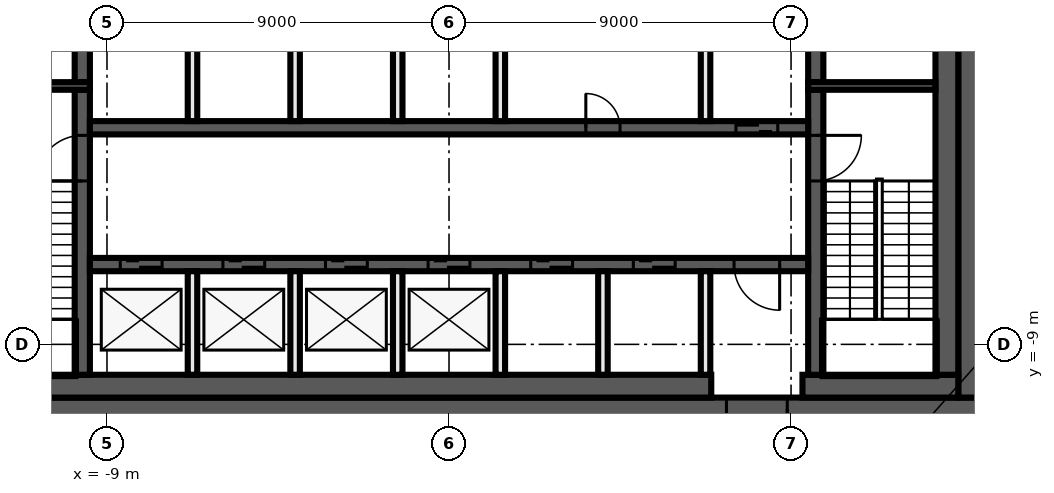
"""IFC4 building model, lengths in metres.
Left out: names, types, materials, properties, quantities, classifications, styles, units other than length and angle.
Written with IfcOpenShell. Run it as: python <this file> out.ifc"""

import sys

from ifc_helpers import new_model, si_unit, direction, frame, frame_2d, origin, place, context, subcontext, project, spatial, rectangle, extrude, element, fill, save


model = new_model("IFC4")
c1 = context("Model", 3, precision=1e-05, world=origin(), true_north=direction((0.0, 1.0)))
c2 = subcontext(c1, "Body", "Model", "MODEL_VIEW")
j1 = project(units=[si_unit("LENGTHUNIT", "METRE"), si_unit("PLANEANGLEUNIT", "RADIAN")], contexts=[c1])
p1 = place(None, origin())
s1 = spatial("IfcSite", under=j1, at=p1, CompositionType="ELEMENT")
p2 = place(p1, origin())
s2 = spatial("IfcBuilding", under=s1, at=p2, CompositionType="ELEMENT")
p3 = place(p2, frame((0.0, 0.0, 289.2)))
s3 = spatial("IfcBuildingStorey", under=s2, at=p3, CompositionType="ELEMENT", Elevation=289.2)
p4 = place(p3, frame((14.0, -10.7, 0.0), z_axis=(0.0, 0.0, 1.0), x_axis=(-1.0, 0.0, 0.0)))
e1 = element("IfcWall", 1, at=p4, inside=s3, PredefinedType="SHEAR", context=c2, shape_type="SweptSolid", body=[
    extrude(rectangle(XDim=28.0, YDim=0.6, at=frame_2d((14.0, 0.0))), origin(), (0.0, 0.0, 1.0), 4.62),
])
p5 = place(p4, frame((5.1, 0.0, 0.0)))
e2 = element("IfcOpeningElement", 2, at=p5, cuts=e1, PredefinedType="OPENING", context=c2, shape_type="SweptSolid", body=[
    extrude(rectangle(XDim=1.6, YDim=2.1, at=frame_2d((0.8, 1.05))), frame((0.0, 0.31, 0.0), z_axis=(0.0, -1.0, 0.0), x_axis=(1.0, 0.0, 0.0)), (0.0, 0.0, 1.0), 0.62),
])
p6 = place(p3, frame((13.7, 10.4, 0.0), z_axis=(0.0, 0.0, 1.0), x_axis=(0.0, -1.0, 0.0)))
e3 = element("IfcWall", 3, at=p6, inside=s3, PredefinedType="SHEAR", context=c2, shape_type="SweptSolid", body=[
    extrude(rectangle(XDim=20.8, YDim=0.6, at=frame_2d((10.4, 0.0))), origin(), (0.0, 0.0, 1.0), 4.62),
])
p7 = place(p3, frame((13.4, -10.1, 0.0), z_axis=(0.0, 0.0, 1.0), x_axis=(-1.0, 0.0, 0.0)))
e4 = element("IfcWall", 4, at=p7, inside=s3, PredefinedType="SHEAR", context=c2, shape_type="SweptSolid", body=[
    extrude(rectangle(XDim=4.1, YDim=0.6, at=frame_2d((2.05, 0.0))), origin(), (0.0, 0.0, 1.0), 4.62),
])
p8 = place(p3, frame((6.9, -10.1, 0.0), z_axis=(0.0, 0.0, 1.0), x_axis=(-1.0, 0.0, 0.0)))
e5 = element("IfcWall", 5, at=p8, inside=s3, PredefinedType="SHEAR", context=c2, shape_type="SweptSolid", body=[
    extrude(rectangle(XDim=20.3, YDim=0.6, at=frame_2d((10.15, 0.0))), origin(), (0.0, 0.0, 1.0), 4.62),
])
p9 = place(p3, frame((13.1, 9.8, 0.0), z_axis=(0.0, 0.0, 1.0), x_axis=(0.0, -1.0, 0.0)))
e6 = element("IfcWall", 6, at=p9, inside=s3, PredefinedType="SHEAR", context=c2, shape_type="SweptSolid", body=[
    extrude(rectangle(XDim=19.6, YDim=0.6, at=frame_2d((9.8, 0.0))), origin(), (0.0, 0.0, 1.0), 4.62),
])
p10 = place(p3, frame((9.65, -2.3, 0.0), z_axis=(0.0, 0.0, 1.0), x_axis=(0.0, -1.0, 0.0)))
e7 = element("IfcWall", 7, at=p10, inside=s3, PredefinedType="SHEAR", context=c2, shape_type="SweptSolid", body=[
    extrude(rectangle(XDim=7.5, YDim=0.4, at=frame_2d((3.75, 0.0))), origin(), (0.0, 0.0, 1.0), 4.62),
])
p11 = place(p10, frame((1.2, 0.0, 0.0)))
e8 = element("IfcOpeningElement", 8, at=p11, cuts=e7, PredefinedType="OPENING", context=c2, shape_type="SweptSolid", body=[
    extrude(rectangle(XDim=1.2, YDim=2.1, at=frame_2d((0.6, 1.05))), frame((0.0, 0.21, 0.0), z_axis=(0.0, -1.0, 0.0), x_axis=(1.0, 0.0, 0.0)), (0.0, 0.0, 1.0), 0.42),
])
p12 = place(p3, frame((9.65, 2.1, 0.0), z_axis=(0.0, 0.0, 1.0), x_axis=(0.0, -1.0, 0.0)))
e9 = element("IfcWall", 9, at=p12, inside=s3, PredefinedType="SHEAR", context=c2, shape_type="SweptSolid", body=[
    extrude(rectangle(XDim=4.2, YDim=0.4, at=frame_2d((2.1, 0.0))), origin(), (0.0, 0.0, 1.0), 4.62),
])
p13 = place(p12, frame((0.15, 0.0, 0.0)))
e10 = element("IfcOpeningElement", 10, at=p13, cuts=e9, PredefinedType="OPENING", context=c2, shape_type="SweptSolid", body=[
    extrude(rectangle(XDim=0.9, YDim=2.1, at=frame_2d((0.45, 1.05))), frame((0.0, 0.21, 0.0), z_axis=(0.0, -1.0, 0.0), x_axis=(1.0, 0.0, 0.0)), (0.0, 0.0, 1.0), 0.42),
])
p14 = place(p3, frame((-9.65, -9.8, 0.0), z_axis=(0.0, 0.0, 1.0), x_axis=(0.0, 1.0, 0.0)))
e11 = element("IfcWall", 11, at=p14, inside=s3, PredefinedType="SHEAR", context=c2, shape_type="SweptSolid", body=[
    extrude(rectangle(XDim=7.5, YDim=0.4, at=frame_2d((3.75, 0.0))), origin(), (0.0, 0.0, 1.0), 4.62),
])
p15 = place(p14, frame((5.1, 0.0, 0.0)))
e12 = element("IfcOpeningElement", 12, at=p15, cuts=e11, PredefinedType="OPENING", context=c2, shape_type="SweptSolid", body=[
    extrude(rectangle(XDim=1.2, YDim=2.1, at=frame_2d((0.6, 1.05))), frame((0.0, 0.21, 0.0), z_axis=(0.0, -1.0, 0.0), x_axis=(1.0, 0.0, 0.0)), (0.0, 0.0, 1.0), 0.42),
])
p16 = place(p3, frame((-9.65, -2.1, 0.0), z_axis=(0.0, 0.0, 1.0), x_axis=(0.0, 1.0, 0.0)))
e13 = element("IfcWall", 13, at=p16, inside=s3, PredefinedType="SHEAR", context=c2, shape_type="SweptSolid", body=[
    extrude(rectangle(XDim=4.2, YDim=0.4, at=frame_2d((2.1, 0.0))), origin(), (0.0, 0.0, 1.0), 4.62),
])
for number, where, z_axis, x_axis in (
    (14, (9.45, -2.2, 0.0), (0.0, 0.0, 1.0), (1.0, 0.0, 0.0)),
    (15, (-9.45, -2.2, 0.0), (0.0, 0.0, 1.0), (-1.0, 0.0, 0.0)),
):
    element("IfcWall", number, at=place(p3, frame(where, z_axis=z_axis, x_axis=x_axis)), inside=s3, PredefinedType="SHEAR", context=c2, shape_type="SweptSolid", body=[
        extrude(rectangle(XDim=3.35, YDim=0.2, at=frame_2d((1.675, 0.0))), origin(), (0.0, 0.0, 1.0), 4.62),
    ])
p17 = place(p3, frame((-9.45, -3.3, 0.0), z_axis=(0.0, 0.0, 1.0), x_axis=(1.0, 0.0, 0.0)))
e16 = element("IfcWall", 16, at=p17, inside=s3, PredefinedType="SHEAR", context=c2, shape_type="SweptSolid", body=[
    extrude(rectangle(XDim=18.9, YDim=0.35, at=frame_2d((9.45, 0.0))), origin(), (0.0, 0.0, 1.0), 4.62),
])
p18 = place(p17, frame((17.0, 0.0, 0.0)))
e17 = element("IfcOpeningElement", 17, at=p18, cuts=e16, PredefinedType="OPENING", context=c2, shape_type="SweptSolid", body=[
    extrude(rectangle(XDim=1.1, YDim=2.1, at=frame_2d((0.55, 1.05))), frame((0.0, 0.185, 0.0), z_axis=(0.0, -1.0, 0.0), x_axis=(1.0, 0.0, 0.0)), (0.0, 0.0, 1.0), 0.37),
])
p19 = place(p17, frame((13.05, 0.0, 0.0)))
e18 = element("IfcOpeningElement", 18, at=p19, cuts=e16, PredefinedType="OPENING", context=c2, shape_type="SweptSolid", body=[
    extrude(rectangle(XDim=0.9, YDim=2.1, at=frame_2d((0.45, 1.05))), frame((0.0, 0.185, 0.0), z_axis=(0.0, -1.0, 0.0), x_axis=(1.0, 0.0, 0.0)), (0.0, 0.0, 1.0), 0.37),
])
p20 = place(p3, frame((9.45, -6.9, 0.0), z_axis=(0.0, 0.0, 1.0), x_axis=(-1.0, 0.0, 0.0)))
e19 = element("IfcWall", 19, at=p20, inside=s3, PredefinedType="SHEAR", context=c2, shape_type="SweptSolid", body=[
    extrude(rectangle(XDim=18.9, YDim=0.35, at=frame_2d((9.45, 0.0))), origin(), (0.0, 0.0, 1.0), 4.62),
])
p21 = place(p20, frame((17.0, 0.0, 0.0)))
e20 = element("IfcOpeningElement", 20, at=p21, cuts=e19, PredefinedType="OPENING", context=c2, shape_type="SweptSolid", body=[
    extrude(rectangle(XDim=1.1, YDim=2.1, at=frame_2d((0.55, 1.05))), frame((0.0, 0.185, 0.0), z_axis=(0.0, -1.0, 0.0), x_axis=(1.0, 0.0, 0.0)), (0.0, 0.0, 1.0), 0.37),
])
p22 = place(p20, frame((14.3, 0.0, 0.0)))
e21 = element("IfcOpeningElement", 21, at=p22, cuts=e19, PredefinedType="OPENING", context=c2, shape_type="SweptSolid", body=[
    extrude(rectangle(XDim=1.1, YDim=2.1, at=frame_2d((0.55, 1.05))), frame((0.0, 0.185, 0.0), z_axis=(0.0, -1.0, 0.0), x_axis=(1.0, 0.0, 0.0)), (0.0, 0.0, 1.0), 0.37),
])
p23 = place(p20, frame((11.6, 0.0, 0.0)))
e22 = element("IfcOpeningElement", 22, at=p23, cuts=e19, PredefinedType="OPENING", context=c2, shape_type="SweptSolid", body=[
    extrude(rectangle(XDim=1.1, YDim=2.1, at=frame_2d((0.55, 1.05))), frame((0.0, 0.185, 0.0), z_axis=(0.0, -1.0, 0.0), x_axis=(1.0, 0.0, 0.0)), (0.0, 0.0, 1.0), 0.37),
])
p24 = place(p20, frame((8.9, 0.0, 0.0)))
e23 = element("IfcOpeningElement", 23, at=p24, cuts=e19, PredefinedType="OPENING", context=c2, shape_type="SweptSolid", body=[
    extrude(rectangle(XDim=1.1, YDim=2.1, at=frame_2d((0.55, 1.05))), frame((0.0, 0.185, 0.0), z_axis=(0.0, -1.0, 0.0), x_axis=(1.0, 0.0, 0.0)), (0.0, 0.0, 1.0), 0.37),
])
p25 = place(p20, frame((6.2, 0.0, 0.0)))
e24 = element("IfcOpeningElement", 24, at=p25, cuts=e19, PredefinedType="OPENING", context=c2, shape_type="SweptSolid", body=[
    extrude(rectangle(XDim=1.1, YDim=2.1, at=frame_2d((0.55, 1.05))), frame((0.0, 0.185, 0.0), z_axis=(0.0, -1.0, 0.0), x_axis=(1.0, 0.0, 0.0)), (0.0, 0.0, 1.0), 0.37),
])
p26 = place(p20, frame((3.5, 0.0, 0.0)))
e25 = element("IfcOpeningElement", 25, at=p26, cuts=e19, PredefinedType="OPENING", context=c2, shape_type="SweptSolid", body=[
    extrude(rectangle(XDim=1.1, YDim=2.1, at=frame_2d((0.55, 1.05))), frame((0.0, 0.185, 0.0), z_axis=(0.0, -1.0, 0.0), x_axis=(1.0, 0.0, 0.0)), (0.0, 0.0, 1.0), 0.37),
])
p27 = place(p20, frame((0.75, 0.0, 0.0)))
e26 = element("IfcOpeningElement", 26, at=p27, cuts=e19, PredefinedType="OPENING", context=c2, shape_type="SweptSolid", body=[
    extrude(rectangle(XDim=1.2, YDim=2.1, at=frame_2d((0.6, 1.05))), frame((0.0, 0.185, 0.0), z_axis=(0.0, -1.0, 0.0), x_axis=(1.0, 0.0, 0.0)), (0.0, 0.0, 1.0), 0.37),
])
for number, where, z_axis, x_axis in (
    (27, (6.75, -9.8, 0.0), (0.0, 0.0, 1.0), (0.0, 1.0, 0.0)),
    (28, (6.75, -3.125, 0.0), (0.0, 0.0, 1.0), (0.0, 1.0, 0.0)),
    (29, (4.05, -9.8, 0.0), (0.0, 0.0, 1.0), (0.0, 1.0, 0.0)),
    (30, (1.35, -9.8, 0.0), (0.0, 0.0, 1.0), (0.0, 1.0, 0.0)),
    (31, (1.35, -3.125, 0.0), (0.0, 0.0, 1.0), (0.0, 1.0, 0.0)),
    (32, (-1.35, -9.8, 0.0), (0.0, 0.0, 1.0), (0.0, 1.0, 0.0)),
    (33, (-1.35, -3.125, 0.0), (0.0, 0.0, 1.0), (0.0, 1.0, 0.0)),
    (34, (-4.05, -9.8, 0.0), (0.0, 0.0, 1.0), (0.0, 1.0, 0.0)),
    (35, (-4.05, -3.125, 0.0), (0.0, 0.0, 1.0), (0.0, 1.0, 0.0)),
    (36, (-6.75, -9.8, 0.0), (0.0, 0.0, 1.0), (0.0, 1.0, 0.0)),
    (37, (-6.75, -3.125, 0.0), (0.0, 0.0, 1.0), (0.0, 1.0, 0.0)),
):
    element("IfcWall", number, at=place(p3, frame(where, z_axis=z_axis, x_axis=x_axis)), inside=s3, PredefinedType="SOLIDWALL", context=c2, shape_type="SweptSolid", body=[
        extrude(rectangle(XDim=2.725, YDim=0.25, at=frame_2d((1.363, 0.0))), origin(), (0.0, 0.0, 1.0), 4.62),
    ])
p28 = place(p18, origin())
e38 = element("IfcDoor", 38, at=p28, inside=s3, OperationType="DOUBLE_DOOR_SLIDING", PredefinedType="DOOR", context=c2, shape_type="SweptSolid", body=[
    extrude(rectangle(XDim=1.1, YDim=2.1, at=frame_2d((0.55, 1.05))), frame((0.0, 0.025, 0.0), z_axis=(0.0, -1.0, 0.0), x_axis=(1.0, 0.0, 0.0)), (0.0, 0.0, 1.0), 0.05),
])
fill(e17, e38)
p29 = place(p21, origin())
e39 = element("IfcDoor", 39, at=p29, inside=s3, OperationType="DOUBLE_DOOR_SLIDING", PredefinedType="DOOR", context=c2, shape_type="SweptSolid", body=[
    extrude(rectangle(XDim=1.1, YDim=2.1, at=frame_2d((0.55, 1.05))), frame((0.0, 0.025, 0.0), z_axis=(0.0, -1.0, 0.0), x_axis=(1.0, 0.0, 0.0)), (0.0, 0.0, 1.0), 0.05),
])
fill(e20, e39)
p30 = place(p22, origin())
e40 = element("IfcDoor", 40, at=p30, inside=s3, OperationType="DOUBLE_DOOR_SLIDING", PredefinedType="DOOR", context=c2, shape_type="SweptSolid", body=[
    extrude(rectangle(XDim=1.1, YDim=2.1, at=frame_2d((0.55, 1.05))), frame((0.0, 0.025, 0.0), z_axis=(0.0, -1.0, 0.0), x_axis=(1.0, 0.0, 0.0)), (0.0, 0.0, 1.0), 0.05),
])
fill(e21, e40)
p31 = place(p23, origin())
e41 = element("IfcDoor", 41, at=p31, inside=s3, OperationType="DOUBLE_DOOR_SLIDING", PredefinedType="DOOR", context=c2, shape_type="SweptSolid", body=[
    extrude(rectangle(XDim=1.1, YDim=2.1, at=frame_2d((0.55, 1.05))), frame((0.0, 0.025, 0.0), z_axis=(0.0, -1.0, 0.0), x_axis=(1.0, 0.0, 0.0)), (0.0, 0.0, 1.0), 0.05),
])
fill(e22, e41)
p32 = place(p24, origin())
e42 = element("IfcDoor", 42, at=p32, inside=s3, OperationType="DOUBLE_DOOR_SLIDING", PredefinedType="DOOR", context=c2, shape_type="SweptSolid", body=[
    extrude(rectangle(XDim=1.1, YDim=2.1, at=frame_2d((0.55, 1.05))), frame((0.0, 0.025, 0.0), z_axis=(0.0, -1.0, 0.0), x_axis=(1.0, 0.0, 0.0)), (0.0, 0.0, 1.0), 0.05),
])
fill(e23, e42)
p33 = place(p25, origin())
e43 = element("IfcDoor", 43, at=p33, inside=s3, OperationType="DOUBLE_DOOR_SLIDING", PredefinedType="DOOR", context=c2, shape_type="SweptSolid", body=[
    extrude(rectangle(XDim=1.1, YDim=2.1, at=frame_2d((0.55, 1.05))), frame((0.0, 0.025, 0.0), z_axis=(0.0, -1.0, 0.0), x_axis=(1.0, 0.0, 0.0)), (0.0, 0.0, 1.0), 0.05),
])
fill(e24, e43)
p34 = place(p26, origin())
e44 = element("IfcDoor", 44, at=p34, inside=s3, OperationType="DOUBLE_DOOR_SLIDING", PredefinedType="DOOR", context=c2, shape_type="SweptSolid", body=[
    extrude(rectangle(XDim=1.1, YDim=2.1, at=frame_2d((0.55, 1.05))), frame((0.0, 0.025, 0.0), z_axis=(0.0, -1.0, 0.0), x_axis=(1.0, 0.0, 0.0)), (0.0, 0.0, 1.0), 0.05),
])
fill(e25, e44)
p35 = place(p5, origin())
e45 = element("IfcDoor", 45, at=p35, inside=s3, OperationType="DOUBLE_DOOR_SINGLE_SWING", PredefinedType="DOOR", context=c2, shape_type="SweptSolid", body=[
    extrude(rectangle(XDim=1.6, YDim=2.1, at=frame_2d((0.8, 1.05))), frame((0.0, 0.025, 0.0), z_axis=(0.0, -1.0, 0.0), x_axis=(1.0, 0.0, 0.0)), (0.0, 0.0, 1.0), 0.05),
])
fill(e2, e45)
p36 = place(p27, origin())
e46 = element("IfcDoor", 46, at=p36, inside=s3, OperationType="SINGLE_SWING_LEFT", PredefinedType="DOOR", context=c2, shape_type="SweptSolid", body=[
    extrude(rectangle(XDim=1.2, YDim=2.1, at=frame_2d((0.6, 1.05))), frame((0.0, 0.025, 0.0), z_axis=(0.0, -1.0, 0.0), x_axis=(1.0, 0.0, 0.0)), (0.0, 0.0, 1.0), 0.05),
])
fill(e26, e46)
p37 = place(p19, origin())
e47 = element("IfcDoor", 47, at=p37, inside=s3, OperationType="SINGLE_SWING_LEFT", PredefinedType="DOOR", context=c2, shape_type="SweptSolid", body=[
    extrude(rectangle(XDim=0.9, YDim=2.1, at=frame_2d((0.45, 1.05))), frame((0.0, 0.025, 0.0), z_axis=(0.0, -1.0, 0.0), x_axis=(1.0, 0.0, 0.0)), (0.0, 0.0, 1.0), 0.05),
])
fill(e18, e47)
p38 = place(p11, origin())
e48 = element("IfcDoor", 48, at=p38, inside=s3, OperationType="SINGLE_SWING_RIGHT", PredefinedType="DOOR", context=c2, shape_type="SweptSolid", body=[
    extrude(rectangle(XDim=1.2, YDim=2.1, at=frame_2d((0.6, 1.05))), frame((0.0, 0.025, 0.0), z_axis=(0.0, -1.0, 0.0), x_axis=(1.0, 0.0, 0.0)), (0.0, 0.0, 1.0), 0.05),
])
fill(e8, e48)
p39 = place(p15, origin())
e49 = element("IfcDoor", 49, at=p39, inside=s3, OperationType="SINGLE_SWING_LEFT", PredefinedType="DOOR", context=c2, shape_type="SweptSolid", body=[
    extrude(rectangle(XDim=1.2, YDim=2.1, at=frame_2d((0.6, 1.05))), frame((0.0, 0.025, 0.0), z_axis=(0.0, -1.0, 0.0), x_axis=(1.0, 0.0, 0.0)), (0.0, 0.0, 1.0), 0.05),
])
fill(e12, e49)
save(model, sys.argv[1])
